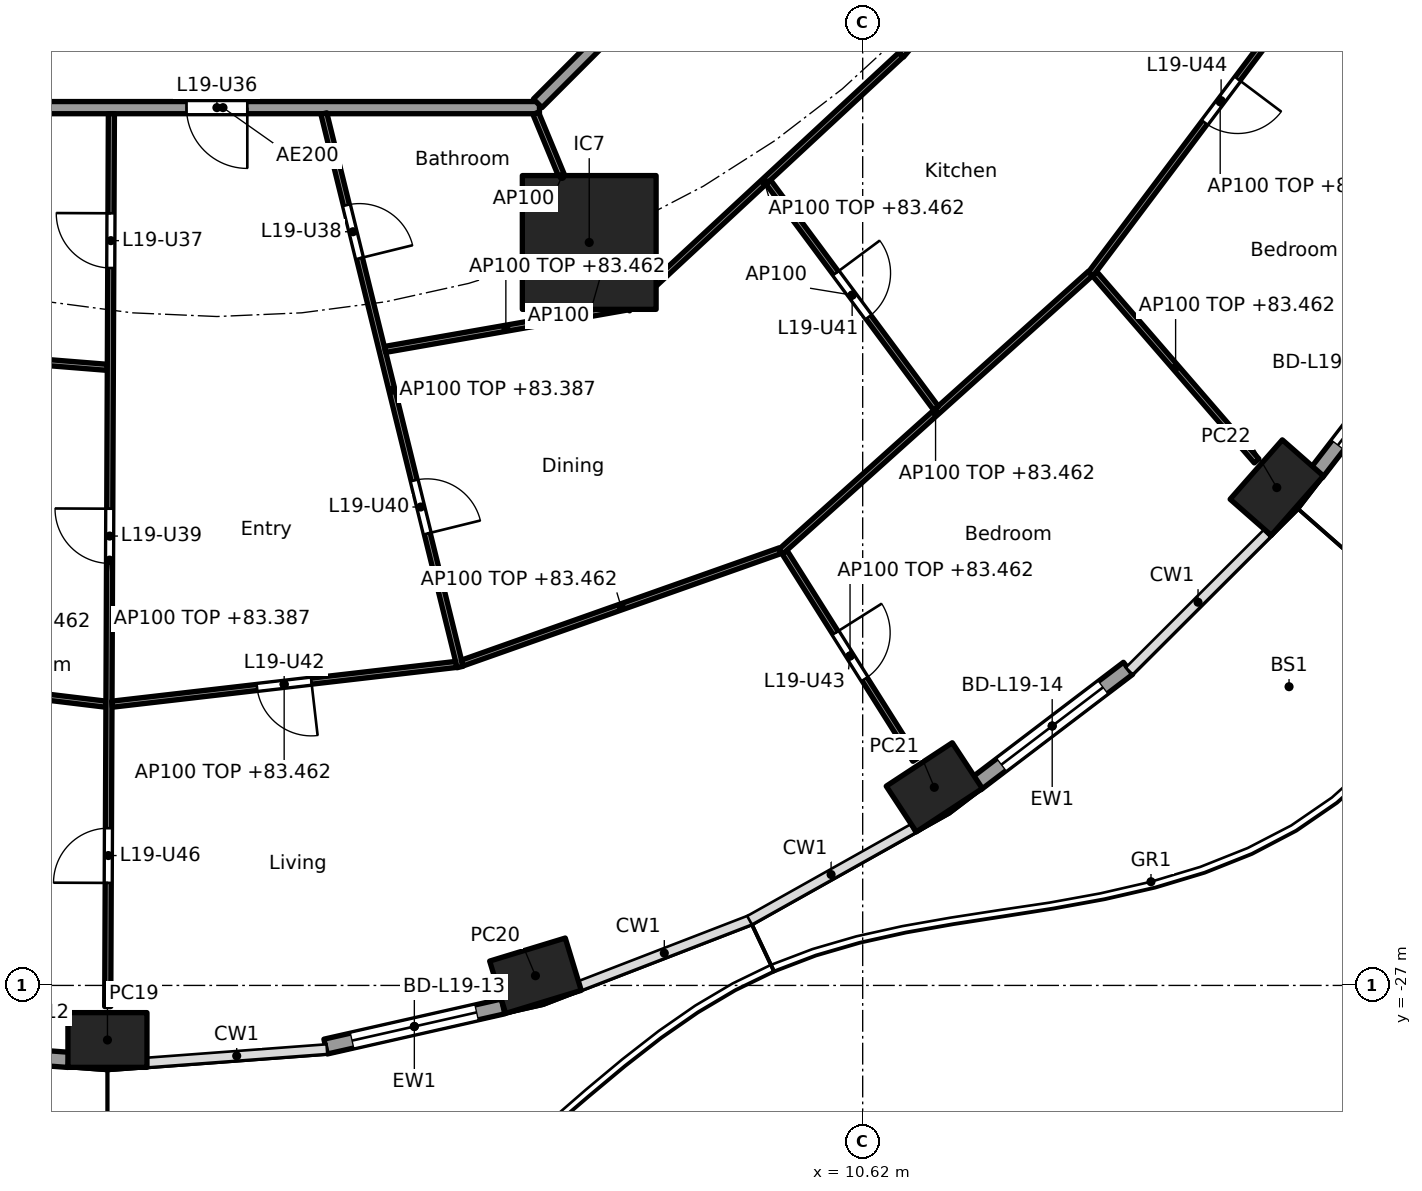
"""IFC4 building model, lengths in metres.
Left out: names, types, materials, properties, quantities, classifications, styles, units other than length and angle.
Written with IfcOpenShell. Run it as: python <this file> out.ifc"""

import sys

from ifc_helpers import new_model, si_unit, direction, frame, frame_2d, origin, origin_2d, place, context, subcontext, project, spatial, rectangle, hollow_rectangle, extrude, element, fill, save


model = new_model("IFC4")
c1 = context("Model", 3, precision=1e-05, world=origin(), true_north=direction((0.0, 1.0)))
c2 = subcontext(c1, "Body", "Model", "MODEL_VIEW")
j1 = project(units=[si_unit("LENGTHUNIT", "METRE"), si_unit("PLANEANGLEUNIT", "RADIAN")], contexts=[c1])
p1 = place(None, origin())
s1 = spatial("IfcSite", under=j1, at=p1, CompositionType="ELEMENT")
p2 = place(p1, origin())
s2 = spatial("IfcBuilding", under=s1, at=p2, CompositionType="ELEMENT")
p3 = place(p2, frame((0.0, 0.0, 80.7)))
s3 = spatial("IfcBuildingStorey", under=s2, at=p3, CompositionType="ELEMENT", Elevation=80.7)
for number, where, z_axis, x_axis in (
    (1, (-1.8, -27.897, 0.0), (0.0, 0.0, 1.0), (1.0, 0.0, 0.0)),
    (2, (5.239, -26.841, 0.0), (0.0, 0.0, 1.0), (0.957, 0.292, 0.0)),
    (3, (11.798, -23.742, 0.0), (0.0, 0.0, 1.0), (0.836, 0.549, 0.0)),
    (4, (17.43, -18.813, 0.0), (0.0, 0.0, 1.0), (0.66, 0.751, 0.0)),
):
    element("IfcColumn", number, at=place(p3, frame(where, z_axis=z_axis, x_axis=x_axis)), inside=s3, PredefinedType="COLUMN", context=c2, shape_type="SweptSolid", body=[
        extrude(hollow_rectangle(XDim=1.3, YDim=0.9, WallThickness=0.045, at=origin_2d()), origin(), (0.0, 0.0, 1.0), 3.7),
    ])
p4 = place(p3, frame((6.123, -14.782, 0.0), z_axis=(0.0, 0.0, 1.0), x_axis=(1.0, 0.0, 0.0)))
e5 = element("IfcColumn", 5, at=p4, inside=s3, PredefinedType="COLUMN", context=c2, shape_type="SweptSolid", body=[
    extrude(rectangle(XDim=2.2, YDim=2.2, at=origin_2d()), origin(), (0.0, 0.0, 1.0), 3.7),
])
p5 = place(p3, frame((-2.439, -28.224, 0.0), z_axis=(0.0, 0.0, 1.0), x_axis=(-0.997225719788, 0.074436978672, 0.0)))
e6 = element("IfcWall", 6, at=p5, inside=s3, PredefinedType="SOLIDWALL", context=c2, shape_type="SweptSolid", body=[
    extrude(rectangle(XDim=2.975, YDim=0.25, at=frame_2d((1.487, 0.0))), origin(), (0.0, 0.0, 1.0), 3.44),
])
p6 = place(p5, frame((0.438, 0.0, 0.0)))
e7 = element("IfcOpeningElement", 7, at=p6, cuts=e6, PredefinedType="OPENING", context=c2, shape_type="SweptSolid", body=[
    extrude(rectangle(XDim=2.1, YDim=2.4, at=frame_2d((1.05, 1.2))), frame((0.0, 0.135, 0.0), z_axis=(0.0, -1.0, 0.0), x_axis=(1.0, 0.0, 0.0)), (0.0, 0.0, 1.0), 0.27),
])
p7 = place(p3, frame((4.707, -27.345, 0.0), z_axis=(0.0, 0.0, 1.0), x_axis=(-0.975317607872, -0.220806620767, 0.0)))
e8 = element("IfcWall", 8, at=p7, inside=s3, PredefinedType="SOLIDWALL", context=c2, shape_type="SweptSolid", body=[
    extrude(rectangle(XDim=2.993, YDim=0.25, at=frame_2d((1.497, 0.0))), origin(), (0.0, 0.0, 1.0), 3.44),
])
p8 = place(p7, frame((0.447, 0.0, 0.0)))
e9 = element("IfcOpeningElement", 9, at=p8, cuts=e8, PredefinedType="OPENING", context=c2, shape_type="SweptSolid", body=[
    extrude(rectangle(XDim=2.1, YDim=2.4, at=frame_2d((1.05, 1.2))), frame((0.0, 0.135, 0.0), z_axis=(0.0, -1.0, 0.0), x_axis=(1.0, 0.0, 0.0)), (0.0, 0.0, 1.0), 0.27),
])
p9 = place(p3, frame((14.984, -21.785, 0.0), z_axis=(0.0, 0.0, 1.0), x_axis=(-0.796037575978, -0.605247203736, 0.0)))
e10 = element("IfcWall", 10, at=p9, inside=s3, PredefinedType="SOLIDWALL", context=c2, shape_type="SweptSolid", body=[
    extrude(rectangle(XDim=3.134, YDim=0.25, at=frame_2d((1.567, 0.0))), origin(), (0.0, 0.0, 1.0), 3.44),
])
p10 = place(p9, frame((0.517, 0.0, 0.0)))
e11 = element("IfcOpeningElement", 11, at=p10, cuts=e10, PredefinedType="OPENING", context=c2, shape_type="SweptSolid", body=[
    extrude(rectangle(XDim=2.1, YDim=2.4, at=frame_2d((1.05, 1.2))), frame((0.0, 0.135, 0.0), z_axis=(0.0, -1.0, 0.0), x_axis=(1.0, 0.0, 0.0)), (0.0, 0.0, 1.0), 0.27),
])
p11 = place(p3, frame((20.073, -15.991, 0.0), z_axis=(0.0, 0.0, 1.0), x_axis=(-0.610458970322, -0.792047880847, 0.0)))
e12 = element("IfcWall", 12, at=p11, inside=s3, PredefinedType="SOLIDWALL", context=c2, shape_type="SweptSolid", body=[
    extrude(rectangle(XDim=3.263, YDim=0.25, at=frame_2d((1.631, 0.0))), origin(), (0.0, 0.0, 1.0), 3.44),
])
p12 = place(p11, frame((0.582, 0.0, 0.0)))
e13 = element("IfcOpeningElement", 13, at=p12, cuts=e12, PredefinedType="OPENING", context=c2, shape_type="SweptSolid", body=[
    extrude(rectangle(XDim=2.1, YDim=2.4, at=frame_2d((1.05, 1.2))), frame((0.0, 0.135, 0.0), z_axis=(0.0, -1.0, 0.0), x_axis=(1.0, 0.0, 0.0)), (0.0, 0.0, 1.0), 0.27),
])
p13 = place(p3, frame((14.82, -6.156, 0.0), z_axis=(0.0, 0.0, 1.0), x_axis=(0.750582231659, -0.660777052808, 0.0)))
e14 = element("IfcWall", 14, at=p13, inside=s3, PredefinedType="PARTITIONING", context=c2, shape_type="SweptSolid", body=[
    extrude(rectangle(XDim=8.781, YDim=0.2, at=frame_2d((4.391, 0.0))), origin(), (0.0, 0.0, 1.0), 2.762),
])
p14 = place(p3, frame((-5.104, -12.565, 0.0), z_axis=(0.0, 0.0, 1.0), x_axis=(1.0, 0.0, 0.0)))
e15 = element("IfcWall", 15, at=p14, inside=s3, PredefinedType="PARTITIONING", context=c2, shape_type="SweptSolid", body=[
    extrude(rectangle(XDim=10.409, YDim=0.2, at=frame_2d((5.205, 0.0))), origin(), (0.0, 0.0, 1.0), 3.44),
])
p15 = place(p14, frame((4.604, 0.0, 0.0)))
e16 = element("IfcOpeningElement", 16, at=p15, cuts=e15, PredefinedType="OPENING", context=c2, shape_type="SweptSolid", body=[
    extrude(rectangle(XDim=1.0, YDim=2.1, at=frame_2d((0.5, 1.05))), frame((0.0, 0.11, 0.0), z_axis=(0.0, -1.0, 0.0), x_axis=(1.0, 0.0, 0.0)), (0.0, 0.0, 1.0), 0.22),
])
p16 = place(p3, frame((5.275, -12.494, 0.0), z_axis=(0.0, 0.0, 1.0), x_axis=(0.707106781187, 0.707106781187, 0.0)))
e17 = element("IfcWall", 17, at=p16, inside=s3, PredefinedType="PARTITIONING", context=c2, shape_type="SweptSolid", body=[
    extrude(rectangle(XDim=10.409, YDim=0.2, at=frame_2d((5.205, 0.0))), origin(), (0.0, 0.0, 1.0), 3.44),
])
p17 = place(p3, frame((-6.404, -16.468, 0.0), z_axis=(0.0, 0.0, 1.0), x_axis=(0.996818808981, -0.079701079432, 0.0)))
e18 = element("IfcWall", 18, at=p17, inside=s3, PredefinedType="PARTITIONING", context=c2, shape_type="SweptSolid", body=[
    extrude(rectangle(XDim=4.616, YDim=0.1, at=frame_2d((2.308, 0.0))), origin(), (0.0, 0.0, 1.0), 2.762),
])
p18 = place(p3, frame((-7.586, -21.68, 0.0), z_axis=(0.0, 0.0, 1.0), x_axis=(0.992810189026, -0.119699325668, 0.0)))
e19 = element("IfcWall", 19, at=p18, inside=s3, PredefinedType="PARTITIONING", context=c2, shape_type="SweptSolid", body=[
    extrude(rectangle(XDim=5.803, YDim=0.1, at=frame_2d((2.901, 0.0))), origin(), (0.0, 0.0, 1.0), 2.762),
])
p19 = place(p18, frame((0.988, 0.0, 0.0)))
e20 = element("IfcOpeningElement", 20, at=p19, cuts=e19, PredefinedType="OPENING", context=c2, shape_type="SweptSolid", body=[
    extrude(rectangle(XDim=0.9, YDim=2.1, at=frame_2d((0.45, 1.05))), frame((0.0, 0.06, 0.0), z_axis=(0.0, -1.0, 0.0), x_axis=(1.0, 0.0, 0.0)), (0.0, 0.0, 1.0), 0.12),
])
p20 = place(p3, frame((-1.735, -12.665, 0.0), z_axis=(0.0, 0.0, 1.0), x_axis=(-0.004107048833, -0.999991566039, 0.0)))
e21 = element("IfcWall", 21, at=p20, inside=s3, PredefinedType="PARTITIONING", context=c2, shape_type="SweptSolid", body=[
    extrude(rectangle(XDim=14.683, YDim=0.1, at=frame_2d((7.341, 0.0))), origin(), (0.0, 0.0, 1.0), 2.687),
])
p21 = place(p20, frame((1.637, 0.0, 0.0)))
e22 = element("IfcOpeningElement", 22, at=p21, cuts=e21, PredefinedType="OPENING", context=c2, shape_type="SweptSolid", body=[
    extrude(rectangle(XDim=0.9, YDim=2.1, at=frame_2d((0.45, 1.05))), frame((0.0, 0.06, 0.0), z_axis=(0.0, -1.0, 0.0), x_axis=(1.0, 0.0, 0.0)), (0.0, 0.0, 1.0), 0.12),
])
p22 = place(p20, frame((6.496, 0.0, 0.0)))
e23 = element("IfcOpeningElement", 23, at=p22, cuts=e21, PredefinedType="OPENING", context=c2, shape_type="SweptSolid", body=[
    extrude(rectangle(XDim=0.9, YDim=2.1, at=frame_2d((0.45, 1.05))), frame((0.0, 0.06, 0.0), z_axis=(0.0, -1.0, 0.0), x_axis=(1.0, 0.0, 0.0)), (0.0, 0.0, 1.0), 0.12),
])
p23 = place(p20, frame((11.75, 0.0, 0.0)))
e24 = element("IfcOpeningElement", 24, at=p23, cuts=e21, PredefinedType="OPENING", context=c2, shape_type="SweptSolid", body=[
    extrude(rectangle(XDim=0.9, YDim=2.1, at=frame_2d((0.45, 1.05))), frame((0.0, 0.06, 0.0), z_axis=(0.0, -1.0, 0.0), x_axis=(1.0, 0.0, 0.0)), (0.0, 0.0, 1.0), 0.12),
])
p24 = place(p3, frame((-1.726, -22.375, 0.0), z_axis=(0.0, 0.0, 1.0), x_axis=(0.99339223329, 0.114768771187, 0.0)))
e25 = element("IfcWall", 25, at=p24, inside=s3, PredefinedType="PARTITIONING", context=c2, shape_type="SweptSolid", body=[
    extrude(rectangle(XDim=5.701, YDim=0.1, at=frame_2d((2.851, 0.0))), origin(), (0.0, 0.0, 1.0), 2.762),
])
p25 = place(p24, frame((2.4, 0.0, 0.0)))
e26 = element("IfcOpeningElement", 26, at=p25, cuts=e25, PredefinedType="OPENING", context=c2, shape_type="SweptSolid", body=[
    extrude(rectangle(XDim=0.9, YDim=2.1, at=frame_2d((0.45, 1.05))), frame((0.0, 0.06, 0.0), z_axis=(0.0, -1.0, 0.0), x_axis=(1.0, 0.0, 0.0)), (0.0, 0.0, 1.0), 0.12),
])
p26 = place(p3, frame((1.759, -12.662, 0.0), z_axis=(0.0, 0.0, 1.0), x_axis=(0.239022447434, -0.971014041929, 0.0)))
e27 = element("IfcWall", 27, at=p26, inside=s3, PredefinedType="PARTITIONING", context=c2, shape_type="SweptSolid", body=[
    extrude(rectangle(XDim=9.374, YDim=0.1, at=frame_2d((4.687, 0.0))), origin(), (0.0, 0.0, 1.0), 2.687),
])
p27 = place(p26, frame((1.552, 0.0, 0.0)))
e28 = element("IfcOpeningElement", 28, at=p27, cuts=e27, PredefinedType="OPENING", context=c2, shape_type="SweptSolid", body=[
    extrude(rectangle(XDim=0.9, YDim=2.1, at=frame_2d((0.45, 1.05))), frame((0.0, 0.06, 0.0), z_axis=(0.0, -1.0, 0.0), x_axis=(1.0, 0.0, 0.0)), (0.0, 0.0, 1.0), 0.12),
])
p28 = place(p26, frame((6.214, 0.0, 0.0)))
e29 = element("IfcOpeningElement", 29, at=p28, cuts=e27, PredefinedType="OPENING", context=c2, shape_type="SweptSolid", body=[
    extrude(rectangle(XDim=0.9, YDim=2.1, at=frame_2d((0.45, 1.05))), frame((0.0, 0.06, 0.0), z_axis=(0.0, -1.0, 0.0), x_axis=(1.0, 0.0, 0.0)), (0.0, 0.0, 1.0), 0.12),
])
p29 = place(p3, frame((2.765, -16.541, 0.0), z_axis=(0.0, 0.0, 1.0), x_axis=(0.985002709003, 0.172538874623, 0.0)))
e30 = element("IfcWall", 30, at=p29, inside=s3, PredefinedType="PARTITIONING", context=c2, shape_type="SweptSolid", body=[
    extrude(rectangle(XDim=4.034, YDim=0.1, at=frame_2d((2.017, 0.0))), origin(), (0.0, 0.0, 1.0), 2.762),
])
p30 = place(p3, frame((4.034, -21.698, 0.0), z_axis=(0.0, 0.0, 1.0), x_axis=(0.942864271692, 0.333177077794, 0.0)))
e31 = element("IfcWall", 31, at=p30, inside=s3, PredefinedType="PARTITIONING", context=c2, shape_type="SweptSolid", body=[
    extrude(rectangle(XDim=5.545, YDim=0.1, at=frame_2d((2.772, 0.0))), origin(), (0.0, 0.0, 1.0), 2.762),
])
p31 = place(p3, frame((5.243, -12.657, 0.0), z_axis=(0.0, 0.0, 1.0), x_axis=(0.382719158442, -0.923864733477, 0.0)))
e32 = element("IfcWall", 32, at=p31, inside=s3, PredefinedType="PARTITIONING", context=c2, shape_type="SweptSolid", body=[
    extrude(rectangle(XDim=2.25, YDim=0.1, at=frame_2d((1.125, 0.0))), origin(), (0.0, 0.0, 1.0), 3.44),
])
p32 = place(p3, frame((6.751, -15.87, 0.0), z_axis=(0.0, 0.0, 1.0), x_axis=(0.733003105791, 0.680225291283, 0.0)))
e33 = element("IfcWall", 33, at=p32, inside=s3, PredefinedType="PARTITIONING", context=c2, shape_type="SweptSolid", body=[
    extrude(rectangle(XDim=6.138, YDim=0.1, at=frame_2d((3.069, 0.0))), origin(), (0.0, 0.0, 1.0), 2.762),
])
p33 = place(p3, frame((9.336, -19.877, 0.0), z_axis=(0.0, 0.0, 1.0), x_axis=(0.533525984139, -0.845783674617, 0.0)))
e34 = element("IfcWall", 34, at=p33, inside=s3, PredefinedType="PARTITIONING", context=c2, shape_type="SweptSolid", body=[
    extrude(rectangle(XDim=4.033, YDim=0.1, at=frame_2d((2.016, 0.0))), origin(), (0.0, 0.0, 1.0), 2.762),
])
p34 = place(p33, frame((1.566, 0.0, 0.0)))
e35 = element("IfcOpeningElement", 35, at=p34, cuts=e34, PredefinedType="OPENING", context=c2, shape_type="SweptSolid", body=[
    extrude(rectangle(XDim=0.9, YDim=2.1, at=frame_2d((0.45, 1.05))), frame((0.0, 0.06, 0.0), z_axis=(0.0, -1.0, 0.0), x_axis=(1.0, 0.0, 0.0)), (0.0, 0.0, 1.0), 0.12),
])
p35 = place(p3, frame((9.272, -19.868, 0.0), z_axis=(0.0, 0.0, 1.0), x_axis=(0.743884413566, 0.668308296562, 0.0)))
e36 = element("IfcWall", 36, at=p35, inside=s3, PredefinedType="PARTITIONING", context=c2, shape_type="SweptSolid", body=[
    extrude(rectangle(XDim=6.845, YDim=0.1, at=frame_2d((3.423, 0.0))), origin(), (0.0, 0.0, 1.0), 2.762),
])
p36 = place(p3, frame((9.067, -13.789, 0.0), z_axis=(0.0, 0.0, 1.0), x_axis=(0.5958491185, -0.80309640018, 0.0)))
e37 = element("IfcWall", 37, at=p36, inside=s3, PredefinedType="PARTITIONING", context=c2, shape_type="SweptSolid", body=[
    extrude(rectangle(XDim=4.63, YDim=0.1, at=frame_2d((2.315, 0.0))), origin(), (0.0, 0.0, 1.0), 3.44),
])
p37 = place(p36, frame((1.865, 0.0, 0.0)))
e38 = element("IfcOpeningElement", 38, at=p37, cuts=e37, PredefinedType="OPENING", context=c2, shape_type="SweptSolid", body=[
    extrude(rectangle(XDim=0.9, YDim=2.1, at=frame_2d((0.45, 1.05))), frame((0.0, 0.06, 0.0), z_axis=(0.0, -1.0, 0.0), x_axis=(1.0, 0.0, 0.0)), (0.0, 0.0, 1.0), 0.12),
])
p38 = place(p3, frame((11.255, -11.699, 0.0), z_axis=(0.0, 0.0, 1.0), x_axis=(0.646107653745, 0.763246290375, 0.0)))
e39 = element("IfcWall", 39, at=p38, inside=s3, PredefinedType="PARTITIONING", context=c2, shape_type="SweptSolid", body=[
    extrude(rectangle(XDim=6.417, YDim=0.1, at=frame_2d((3.208, 0.0))), origin(), (0.0, 0.0, 1.0), 2.762),
])
p39 = place(p38, frame((2.784, 0.0, 0.0)))
e40 = element("IfcOpeningElement", 40, at=p39, cuts=e39, PredefinedType="OPENING", context=c2, shape_type="SweptSolid", body=[
    extrude(rectangle(XDim=0.9, YDim=2.1, at=frame_2d((0.45, 1.05))), frame((0.0, 0.06, 0.0), z_axis=(0.0, -1.0, 0.0), x_axis=(1.0, 0.0, 0.0)), (0.0, 0.0, 1.0), 0.12),
])
p40 = place(p3, frame((14.435, -15.297, 0.0), z_axis=(0.0, 0.0, 1.0), x_axis=(0.654405107766, -0.756144136345, 0.0)))
e41 = element("IfcWall", 41, at=p40, inside=s3, PredefinedType="PARTITIONING", context=c2, shape_type="SweptSolid", body=[
    extrude(rectangle(XDim=4.07, YDim=0.1, at=frame_2d((2.035, 0.0))), origin(), (0.0, 0.0, 1.0), 2.762),
])
p41 = place(p3, frame((14.372, -15.3, 0.0), z_axis=(0.0, 0.0, 1.0), x_axis=(0.600987107857, 0.79925871668, 0.0)))
e42 = element("IfcWall", 42, at=p41, inside=s3, PredefinedType="PARTITIONING", context=c2, shape_type="SweptSolid", body=[
    extrude(rectangle(XDim=7.08, YDim=0.1, at=frame_2d((3.54, 0.0))), origin(), (0.0, 0.0, 1.0), 2.762),
])
p42 = place(p41, frame((3.115, 0.0, 0.0)))
e43 = element("IfcOpeningElement", 43, at=p42, cuts=e42, PredefinedType="OPENING", context=c2, shape_type="SweptSolid", body=[
    extrude(rectangle(XDim=0.9, YDim=2.1, at=frame_2d((0.45, 1.05))), frame((0.0, 0.06, 0.0), z_axis=(0.0, -1.0, 0.0), x_axis=(1.0, 0.0, 0.0)), (0.0, 0.0, 1.0), 0.12),
])
p43 = place(p3, frame((6.051, -14.855, 0.0), z_axis=(0.0, 0.0, 1.0), x_axis=(0.533542828537, -0.845773048824, 0.0)))
e44 = element("IfcWall", 44, at=p43, inside=s3, PredefinedType="PARTITIONING", context=c2, shape_type="SweptSolid", body=[
    extrude(rectangle(XDim=1.021, YDim=0.1, at=frame_2d((0.51, 0.0))), origin(), (0.0, 0.0, 1.0), 3.44),
])
p44 = place(p8, origin())
e45 = element("IfcDoor", 45, at=p44, inside=s3, OperationType="SLIDING_TO_LEFT", PredefinedType="DOOR", context=c2, shape_type="SweptSolid", body=[
    extrude(rectangle(XDim=2.1, YDim=2.4, at=frame_2d((1.05, 1.2))), frame((0.0, 0.025, 0.0), z_axis=(0.0, -1.0, 0.0), x_axis=(1.0, 0.0, 0.0)), (0.0, 0.0, 1.0), 0.05),
])
fill(e9, e45)
p45 = place(p10, origin())
e46 = element("IfcDoor", 46, at=p45, inside=s3, OperationType="SLIDING_TO_LEFT", PredefinedType="DOOR", context=c2, shape_type="SweptSolid", body=[
    extrude(rectangle(XDim=2.1, YDim=2.4, at=frame_2d((1.05, 1.2))), frame((0.0, 0.025, 0.0), z_axis=(0.0, -1.0, 0.0), x_axis=(1.0, 0.0, 0.0)), (0.0, 0.0, 1.0), 0.05),
])
fill(e11, e46)
p46 = place(p12, origin())
e47 = element("IfcDoor", 47, at=p46, inside=s3, OperationType="SLIDING_TO_LEFT", PredefinedType="DOOR", context=c2, shape_type="SweptSolid", body=[
    extrude(rectangle(XDim=2.1, YDim=2.4, at=frame_2d((1.05, 1.2))), frame((0.0, 0.025, 0.0), z_axis=(0.0, -1.0, 0.0), x_axis=(1.0, 0.0, 0.0)), (0.0, 0.0, 1.0), 0.05),
])
fill(e13, e47)
p47 = place(p15, frame((1.0, 0.0, 0.0), x_axis=(-1.0, 0.0, 0.0)))
e48 = element("IfcDoor", 48, at=p47, inside=s3, OperationType="SINGLE_SWING_LEFT", PredefinedType="DOOR", context=c2, shape_type="SweptSolid", body=[
    extrude(rectangle(XDim=1.0, YDim=2.1, at=frame_2d((0.5, 1.05))), frame((0.0, 0.025, 0.0), z_axis=(0.0, -1.0, 0.0), x_axis=(1.0, 0.0, 0.0)), (0.0, 0.0, 1.0), 0.05),
])
fill(e16, e48)
p48 = place(p21, frame((0.9, 0.0, 0.0), x_axis=(-1.0, 0.0, 0.0)))
e49 = element("IfcDoor", 49, at=p48, inside=s3, OperationType="SINGLE_SWING_RIGHT", PredefinedType="DOOR", context=c2, shape_type="SweptSolid", body=[
    extrude(rectangle(XDim=0.9, YDim=2.1, at=frame_2d((0.45, 1.05))), frame((0.0, 0.025, 0.0), z_axis=(0.0, -1.0, 0.0), x_axis=(1.0, 0.0, 0.0)), (0.0, 0.0, 1.0), 0.05),
])
fill(e22, e49)
p49 = place(p27, origin())
e50 = element("IfcDoor", 50, at=p49, inside=s3, OperationType="SINGLE_SWING_RIGHT", PredefinedType="DOOR", context=c2, shape_type="SweptSolid", body=[
    extrude(rectangle(XDim=0.9, YDim=2.1, at=frame_2d((0.45, 1.05))), frame((0.0, 0.025, 0.0), z_axis=(0.0, -1.0, 0.0), x_axis=(1.0, 0.0, 0.0)), (0.0, 0.0, 1.0), 0.05),
])
fill(e28, e50)
p50 = place(p22, frame((0.9, 0.0, 0.0), x_axis=(-1.0, 0.0, 0.0)))
e51 = element("IfcDoor", 51, at=p50, inside=s3, OperationType="SINGLE_SWING_RIGHT", PredefinedType="DOOR", context=c2, shape_type="SweptSolid", body=[
    extrude(rectangle(XDim=0.9, YDim=2.1, at=frame_2d((0.45, 1.05))), frame((0.0, 0.025, 0.0), z_axis=(0.0, -1.0, 0.0), x_axis=(1.0, 0.0, 0.0)), (0.0, 0.0, 1.0), 0.05),
])
fill(e23, e51)
p51 = place(p28, origin())
e52 = element("IfcDoor", 52, at=p51, inside=s3, OperationType="SINGLE_SWING_RIGHT", PredefinedType="DOOR", context=c2, shape_type="SweptSolid", body=[
    extrude(rectangle(XDim=0.9, YDim=2.1, at=frame_2d((0.45, 1.05))), frame((0.0, 0.025, 0.0), z_axis=(0.0, -1.0, 0.0), x_axis=(1.0, 0.0, 0.0)), (0.0, 0.0, 1.0), 0.05),
])
fill(e29, e52)
p52 = place(p37, origin())
e53 = element("IfcDoor", 53, at=p52, inside=s3, OperationType="SINGLE_SWING_LEFT", PredefinedType="DOOR", context=c2, shape_type="SweptSolid", body=[
    extrude(rectangle(XDim=0.9, YDim=2.1, at=frame_2d((0.45, 1.05))), frame((0.0, 0.025, 0.0), z_axis=(0.0, -1.0, 0.0), x_axis=(1.0, 0.0, 0.0)), (0.0, 0.0, 1.0), 0.05),
])
fill(e38, e53)
p53 = place(p25, frame((0.9, 0.0, 0.0), x_axis=(-1.0, 0.0, 0.0)))
e54 = element("IfcDoor", 54, at=p53, inside=s3, OperationType="SINGLE_SWING_LEFT", PredefinedType="DOOR", context=c2, shape_type="SweptSolid", body=[
    extrude(rectangle(XDim=0.9, YDim=2.1, at=frame_2d((0.45, 1.05))), frame((0.0, 0.025, 0.0), z_axis=(0.0, -1.0, 0.0), x_axis=(1.0, 0.0, 0.0)), (0.0, 0.0, 1.0), 0.05),
])
fill(e26, e54)
p54 = place(p34, origin())
e55 = element("IfcDoor", 55, at=p54, inside=s3, OperationType="SINGLE_SWING_LEFT", PredefinedType="DOOR", context=c2, shape_type="SweptSolid", body=[
    extrude(rectangle(XDim=0.9, YDim=2.1, at=frame_2d((0.45, 1.05))), frame((0.0, 0.025, 0.0), z_axis=(0.0, -1.0, 0.0), x_axis=(1.0, 0.0, 0.0)), (0.0, 0.0, 1.0), 0.05),
])
fill(e35, e55)
p55 = place(p42, frame((0.9, 0.0, 0.0), x_axis=(-1.0, 0.0, 0.0)))
e56 = element("IfcDoor", 56, at=p55, inside=s3, OperationType="SINGLE_SWING_LEFT", PredefinedType="DOOR", context=c2, shape_type="SweptSolid", body=[
    extrude(rectangle(XDim=0.9, YDim=2.1, at=frame_2d((0.45, 1.05))), frame((0.0, 0.025, 0.0), z_axis=(0.0, -1.0, 0.0), x_axis=(1.0, 0.0, 0.0)), (0.0, 0.0, 1.0), 0.05),
])
fill(e43, e56)
p56 = place(p23, frame((0.9, 0.0, 0.0), x_axis=(-1.0, 0.0, 0.0)))
e57 = element("IfcDoor", 57, at=p56, inside=s3, OperationType="SINGLE_SWING_LEFT", PredefinedType="DOOR", context=c2, shape_type="SweptSolid", body=[
    extrude(rectangle(XDim=0.9, YDim=2.1, at=frame_2d((0.45, 1.05))), frame((0.0, 0.025, 0.0), z_axis=(0.0, -1.0, 0.0), x_axis=(1.0, 0.0, 0.0)), (0.0, 0.0, 1.0), 0.05),
])
fill(e24, e57)
save(model, sys.argv[1])
